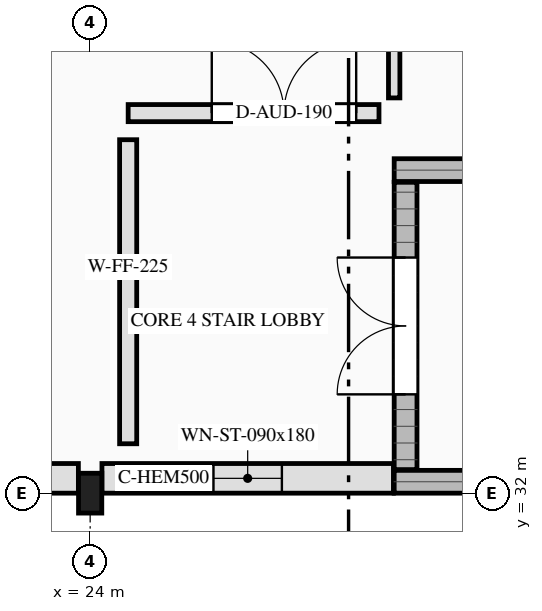
"""IFC4 building model, lengths in metres.
Left out: names, types, materials, properties, quantities, classifications, styles, units other than length and angle.
Written with IfcOpenShell. Run it as: python <this file> out.ifc"""

import sys

from ifc_helpers import new_model, si_unit, direction, frame, frame_2d, origin, origin_2d, place, context, subcontext, project, spatial, rectangle, i_section, extrude, element, fill, save


model = new_model("IFC4")
c1 = context("Model", 3, precision=1e-05, world=origin(), true_north=direction((0.0, 1.0)))
c2 = subcontext(c1, "Body", "Model", "MODEL_VIEW")
j1 = project(units=[si_unit("LENGTHUNIT", "METRE"), si_unit("PLANEANGLEUNIT", "RADIAN")], contexts=[c1])
p1 = place(None, origin())
s1 = spatial("IfcSite", under=j1, at=p1, CompositionType="ELEMENT")
p2 = place(p1, origin())
s2 = spatial("IfcBuilding", under=s1, at=p2, CompositionType="ELEMENT")
p3 = place(p2, frame((0.0, 0.0, 5.4)))
s3 = spatial("IfcBuildingStorey", under=s2, at=p3, CompositionType="ELEMENT", Elevation=5.4)
for number, where, z_axis, x_axis in (
    (1, (28.0, 32.15, 0.0), (0.0, 0.0, 1.0), (1.0, 0.0, 0.0)),
    (2, (28.0, 36.25, 0.0), (0.0, 0.0, 1.0), (1.0, 0.0, 0.0)),
):
    element("IfcWall", number, at=place(p3, frame(where, z_axis=z_axis, x_axis=x_axis)), inside=s3, PredefinedType="SHEAR", context=c2, shape_type="SweptSolid", body=[
        extrude(rectangle(XDim=10.0, YDim=0.3, at=frame_2d((5.0, 0.0))), origin(), (0.0, 0.0, 1.0), 4.2),
    ])
p4 = place(p3, frame((28.15, 32.31, 0.0), z_axis=(0.0, 0.0, 1.0), x_axis=(0.0, 1.0, 0.0)))
e3 = element("IfcWall", 3, at=p4, inside=s3, PredefinedType="SHEAR", context=c2, shape_type="SweptSolid", body=[
    extrude(rectangle(XDim=3.78, YDim=0.3, at=frame_2d((1.89, 0.0))), origin(), (0.0, 0.0, 1.0), 4.2),
])
p5 = place(p4, frame((0.99, 0.0, 0.0)))
e4 = element("IfcOpeningElement", 4, at=p5, cuts=e3, PredefinedType="OPENING", context=c2, shape_type="SweptSolid", body=[
    extrude(rectangle(XDim=1.8, YDim=2.2, at=frame_2d((0.9, 1.1))), frame((0.0, 0.16, 0.0), z_axis=(0.0, -1.0, 0.0), x_axis=(1.0, 0.0, 0.0)), (0.0, 0.0, 1.0), 0.32),
])
p6 = place(p3, frame((24.0, 32.0, 0.0), z_axis=(0.0, 0.0, 1.0), x_axis=(1.0, 0.0, 0.0)))
e5 = element("IfcColumn", 5, at=p6, inside=s3, PredefinedType="COLUMN", context=c2, shape_type="SweptSolid", body=[
    extrude(i_section(OverallWidth=0.306, OverallDepth=0.524, WebThickness=0.021, FlangeThickness=0.04, FilletRadius=0.027, at=origin_2d()), origin(), (0.0, 0.0, 1.0), 4.2),
])
p7 = place(p3, frame((23.845, 32.195, 0.0), z_axis=(0.0, 0.0, 1.0), x_axis=(-1.0, 0.0, 0.0)))
e6 = element("IfcWall", 6, at=p7, inside=s3, PredefinedType="SOLIDWALL", context=c2, shape_type="SweptSolid", body=[
    extrude(rectangle(XDim=7.691, YDim=0.39, at=frame_2d((3.845, 0.0))), origin(), (0.0, 0.0, 1.0), 3.157),
])
p8 = place(p7, frame((3.146, 0.0, 0.85)))
e7 = element("IfcOpeningElement", 7, at=p8, cuts=e6, PredefinedType="OPENING", context=c2, shape_type="SweptSolid", body=[
    extrude(rectangle(XDim=1.4, YDim=1.6, at=frame_2d((0.7, 0.8))), frame((0.0, 0.205, 0.0), z_axis=(0.0, -1.0, 0.0), x_axis=(1.0, 0.0, 0.0)), (0.0, 0.0, 1.0), 0.41),
])
p9 = place(p3, frame((27.99, 32.195, 0.0), z_axis=(0.0, 0.0, 1.0), x_axis=(-1.0, 0.0, 0.0)))
e8 = element("IfcWall", 8, at=p9, inside=s3, PredefinedType="SOLIDWALL", context=c2, shape_type="SweptSolid", body=[
    extrude(rectangle(XDim=3.835, YDim=0.39, at=frame_2d((1.917, 0.0))), origin(), (0.0, 0.0, 1.0), 3.157),
])
p10 = place(p9, frame((1.468, 0.0, 0.85)))
e9 = element("IfcOpeningElement", 9, at=p10, cuts=e8, PredefinedType="OPENING", context=c2, shape_type="SweptSolid", body=[
    extrude(rectangle(XDim=0.9, YDim=1.8, at=frame_2d((0.45, 0.9))), frame((0.0, 0.205, 0.0), z_axis=(0.0, -1.0, 0.0), x_axis=(1.0, 0.0, 0.0)), (0.0, 0.0, 1.0), 0.41),
])
p11 = place(p3, frame((24.5, 37.0, 0.0), z_axis=(0.0, 0.0, 1.0), x_axis=(1.0, 0.0, 0.0)))
e10 = element("IfcWall", 10, at=p11, inside=s3, PredefinedType="SOLIDWALL", context=c2, shape_type="SweptSolid", body=[
    extrude(rectangle(XDim=3.3, YDim=0.225, at=frame_2d((1.65, 0.0))), origin(), (0.0, 0.0, 1.0), 3.875),
])
p12 = place(p11, frame((1.1, 0.0, 0.0)))
e11 = element("IfcOpeningElement", 11, at=p12, cuts=e10, PredefinedType="OPENING", context=c2, shape_type="SweptSolid", body=[
    extrude(rectangle(XDim=1.9, YDim=2.35, at=frame_2d((0.95, 1.175))), frame((0.0, 0.123, 0.0), z_axis=(0.0, -1.0, 0.0), x_axis=(1.0, 0.0, 0.0)), (0.0, 0.0, 1.0), 0.245),
])
p13 = place(p3, frame((28.0, 37.2, 0.0), z_axis=(0.0, 0.0, 1.0), x_axis=(0.0, 1.0, 0.0)))
e12 = element("IfcWall", 12, at=p13, inside=s3, PredefinedType="PARTITIONING", context=c2, shape_type="SweptSolid", body=[
    extrude(rectangle(XDim=16.2, YDim=0.15, at=frame_2d((8.1, 0.0))), origin(), (0.0, 0.0, 1.0), 3.875),
])
p14 = place(p13, frame((12.324, 0.0, 0.0)))
e13 = element("IfcOpeningElement", 13, at=p14, cuts=e12, PredefinedType="OPENING", context=c2, shape_type="SweptSolid", body=[
    extrude(rectangle(XDim=1.1, YDim=2.3, at=frame_2d((0.55, 1.15))), frame((0.0, 0.085, 0.0), z_axis=(0.0, -1.0, 0.0), x_axis=(1.0, 0.0, 0.0)), (0.0, 0.0, 1.0), 0.17),
])
p15 = place(p3, frame((24.5, 32.65, 0.0), z_axis=(0.0, 0.0, 1.0), x_axis=(0.0, 1.0, 0.0)))
e14 = element("IfcWall", 14, at=p15, inside=s3, PredefinedType="SOLIDWALL", context=c2, shape_type="SweptSolid", body=[
    extrude(rectangle(XDim=4.0, YDim=0.225, at=frame_2d((2.0, 0.0))), origin(), (0.0, 0.0, 1.0), 3.875),
])
p16 = place(p10, origin())
e15 = element("IfcWindow", 15, at=p16, inside=s3, PartitioningType="SINGLE_PANEL", PredefinedType="WINDOW", context=c2, shape_type="SweptSolid", body=[
    extrude(rectangle(XDim=0.9, YDim=1.8, at=frame_2d((0.45, 0.9))), frame((0.0, 0.03, 0.0), z_axis=(0.0, -1.0, 0.0), x_axis=(1.0, 0.0, 0.0)), (0.0, 0.0, 1.0), 0.06),
])
fill(e9, e15)
p17 = place(p5, origin())
e16 = element("IfcDoor", 16, at=p17, inside=s3, OperationType="DOUBLE_DOOR_SINGLE_SWING", PredefinedType="DOOR", context=c2, shape_type="SweptSolid", body=[
    extrude(rectangle(XDim=1.8, YDim=2.2, at=frame_2d((0.9, 1.1))), frame((0.0, 0.025, 0.0), z_axis=(0.0, -1.0, 0.0), x_axis=(1.0, 0.0, 0.0)), (0.0, 0.0, 1.0), 0.05),
])
fill(e4, e16)
p18 = place(p12, origin())
e17 = element("IfcDoor", 17, at=p18, inside=s3, OperationType="DOUBLE_DOOR_SINGLE_SWING", PredefinedType="DOOR", context=c2, shape_type="SweptSolid", body=[
    extrude(rectangle(XDim=1.9, YDim=2.35, at=frame_2d((0.95, 1.175))), frame((0.0, 0.025, 0.0), z_axis=(0.0, -1.0, 0.0), x_axis=(1.0, 0.0, 0.0)), (0.0, 0.0, 1.0), 0.05),
])
fill(e11, e17)
save(model, sys.argv[1])
